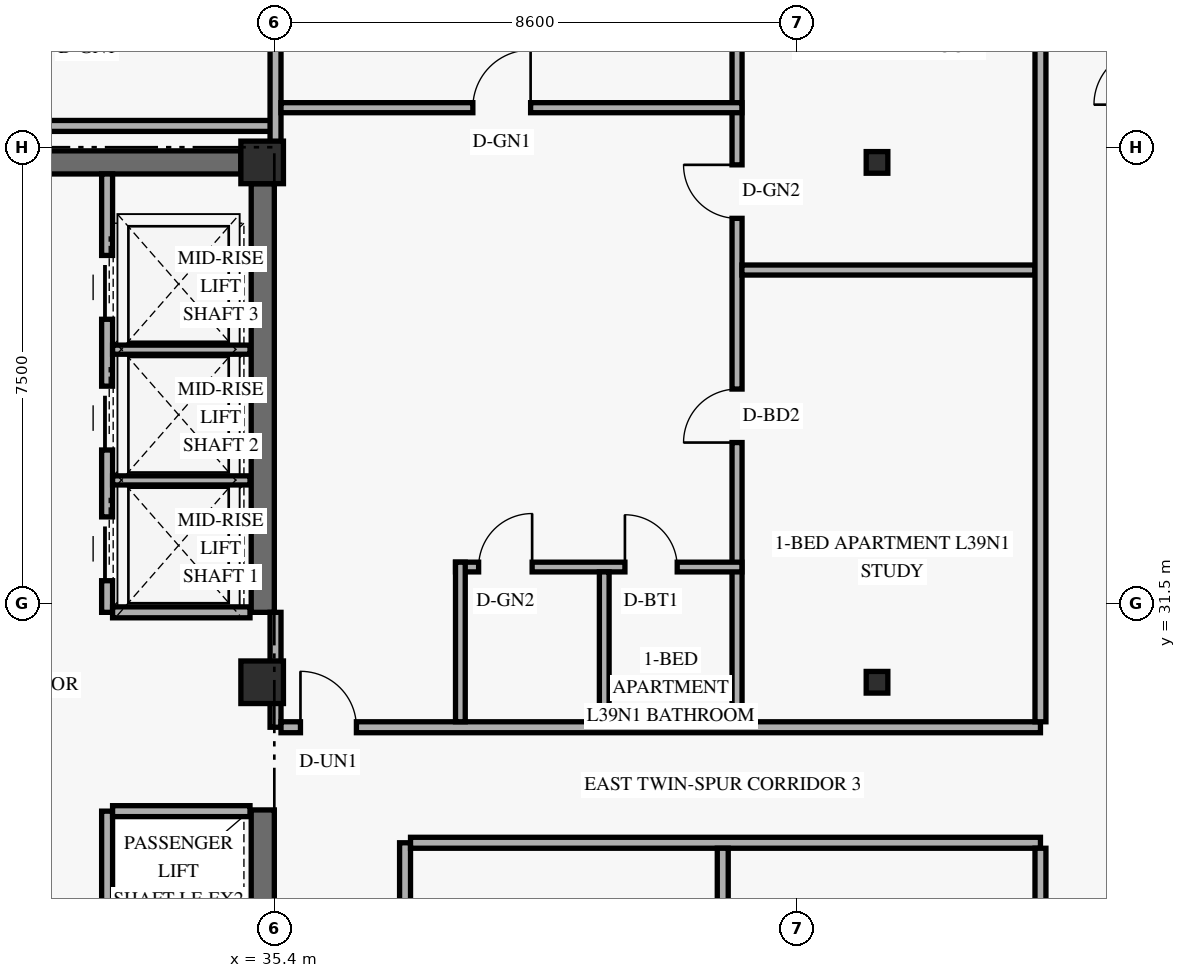
"""IFC4 building model, lengths in metres.
Left out: names, types, materials, properties, quantities, classifications, styles, units other than length and angle.
Written with IfcOpenShell. Run it as: python <this file> out.ifc"""

import sys

from ifc_helpers import new_model, si_unit, direction, frame, frame_2d, origin, origin_2d, place, context, subcontext, project, spatial, rectangle, hollow_rectangle, extrude, element, fill, save


model = new_model("IFC4")
c1 = context("Model", 3, precision=1e-05, world=origin(), true_north=direction((0.0, 1.0)))
c2 = subcontext(c1, "Body", "Model", "MODEL_VIEW")
j1 = project(units=[si_unit("LENGTHUNIT", "METRE"), si_unit("PLANEANGLEUNIT", "RADIAN")], contexts=[c1])
p1 = place(None, origin())
s1 = spatial("IfcSite", under=j1, at=p1, CompositionType="ELEMENT")
p2 = place(p1, origin())
s2 = spatial("IfcBuilding", under=s1, at=p2, CompositionType="ELEMENT")
p3 = place(p2, frame((0.0, 0.0, 151.8)))
s3 = spatial("IfcBuildingStorey", under=s2, at=p3, CompositionType="ELEMENT", Elevation=151.8)
p4 = place(p3, frame((35.21, 17.9, 0.0), z_axis=(0.0, 0.0, 1.0), x_axis=(0.0, 1.0, 0.0)))
e1 = element("IfcWall", 1, at=p4, inside=s3, PredefinedType="SHEAR", context=c2, shape_type="SweptSolid", body=[
    extrude(rectangle(XDim=10.2, YDim=0.38, at=frame_2d((5.1, 0.0))), origin(), (0.0, 0.0, 1.0), 2.748),
])
p5 = place(p3, frame((35.21, 31.35, 0.0), z_axis=(0.0, 0.0, 1.0), x_axis=(0.0, 1.0, 0.0)))
e2 = element("IfcWall", 2, at=p5, inside=s3, PredefinedType="SHEAR", context=c2, shape_type="SweptSolid", body=[
    extrude(rectangle(XDim=7.05, YDim=0.38, at=frame_2d((3.525, 0.0))), origin(), (0.0, 0.0, 1.0), 2.748),
])
p6 = place(p3, frame((24.55, 38.75, 0.0), z_axis=(0.0, 0.0, 1.0), x_axis=(1.0, 0.0, 0.0)))
e3 = element("IfcWall", 3, at=p6, inside=s3, PredefinedType="SHEAR", context=c2, shape_type="SweptSolid", body=[
    extrude(rectangle(XDim=10.3, YDim=0.38, at=frame_2d((5.15, 0.0))), origin(), (0.0, 0.0, 1.0), 3.36),
])
p7 = place(p6, frame((5.2, 0.0, 0.0)))
e4 = element("IfcOpeningElement", 4, at=p7, cuts=e3, PredefinedType="OPENING", context=c2, shape_type="SweptSolid", body=[
    extrude(rectangle(XDim=1.05, YDim=2.15, at=frame_2d((0.525, 1.075))), frame((0.0, 0.2, 0.0), z_axis=(0.0, -1.0, 0.0), x_axis=(1.0, 0.0, 0.0)), (0.0, 0.0, 1.0), 0.4),
])
for number, where, z_axis, x_axis in (
    (5, (35.2, 30.2, 0.0), (0.0, 0.0, 1.0), (1.0, 0.0, 0.0)),
    (6, (35.2, 38.75, 0.0), (0.0, 0.0, 1.0), (1.0, 0.0, 0.0)),
):
    element("IfcColumn", number, at=place(p3, frame(where, z_axis=z_axis, x_axis=x_axis)), inside=s3, PredefinedType="COLUMN", context=c2, shape_type="SweptSolid", body=[
        extrude(rectangle(XDim=0.7, YDim=0.7, at=origin_2d()), origin(), (0.0, 0.0, 1.0), 3.6),
    ])
for number, where, z_axis, x_axis in (
    (7, (45.249, 30.2, 0.0), (0.035, 0.0, 0.999), (0.0, 1.0, 0.0)),
    (8, (45.249, 38.75, 0.0), (0.035, 0.0, 0.999), (0.0, 1.0, 0.0)),
):
    element("IfcColumn", number, at=place(p3, frame(where, z_axis=z_axis, x_axis=x_axis)), inside=s3, PredefinedType="COLUMN", context=c2, shape_type="SweptSolid", body=[
        extrude(hollow_rectangle(XDim=0.356, YDim=0.356, WallThickness=0.016, at=origin_2d()), origin(), (0.0, 0.0, 1.0), 3.602),
    ])
p8 = place(p3, frame((32.65, 18.02, 0.0), z_axis=(0.0, 0.0, 1.0), x_axis=(0.0, 1.0, 0.0)))
e9 = element("IfcWall", 9, at=p8, inside=s3, PredefinedType="STANDARD", context=c2, shape_type="SweptSolid", body=[
    extrude(rectangle(XDim=10.06, YDim=0.18, at=frame_2d((5.03, 0.0))), origin(), (0.0, 0.0, 1.0), 3.36),
])
p9 = place(p3, frame((32.74, 28.08, 0.0), z_axis=(0.0, 0.0, 1.0), x_axis=(1.0, 0.0, 0.0)))
e10 = element("IfcWall", 10, at=p9, inside=s3, PredefinedType="STANDARD", context=c2, shape_type="SweptSolid", body=[
    extrude(rectangle(XDim=2.26, YDim=0.18, at=frame_2d((1.13, 0.0))), origin(), (0.0, 0.0, 1.0), 3.36),
])
p10 = place(p3, frame((32.65, 31.35, 0.0), z_axis=(0.0, 0.0, 1.0), x_axis=(0.0, 1.0, 0.0)))
e11 = element("IfcWall", 11, at=p10, inside=s3, PredefinedType="STANDARD", context=c2, shape_type="SweptSolid", body=[
    extrude(rectangle(XDim=7.21, YDim=0.18, at=frame_2d((3.605, 0.0))), origin(), (0.0, 0.0, 1.0), 3.36),
])
p11 = place(p10, frame((0.52, 0.0, 0.0)))
e12 = element("IfcOpeningElement", 12, at=p11, cuts=e11, PredefinedType="OPENING", context=c2, shape_type="SweptSolid", body=[
    extrude(rectangle(XDim=1.05, YDim=2.2, at=frame_2d((0.525, 1.1))), frame((0.0, 0.1, 0.0), z_axis=(0.0, -1.0, 0.0), x_axis=(1.0, 0.0, 0.0)), (0.0, 0.0, 1.0), 0.2),
])
p12 = place(p10, frame((2.67, 0.0, 0.0)))
e13 = element("IfcOpeningElement", 13, at=p12, cuts=e11, PredefinedType="OPENING", context=c2, shape_type="SweptSolid", body=[
    extrude(rectangle(XDim=1.05, YDim=2.2, at=frame_2d((0.525, 1.1))), frame((0.0, 0.1, 0.0), z_axis=(0.0, -1.0, 0.0), x_axis=(1.0, 0.0, 0.0)), (0.0, 0.0, 1.0), 0.2),
])
p13 = place(p10, frame((4.82, 0.0, 0.0)))
e14 = element("IfcOpeningElement", 14, at=p13, cuts=e11, PredefinedType="OPENING", context=c2, shape_type="SweptSolid", body=[
    extrude(rectangle(XDim=1.05, YDim=2.2, at=frame_2d((0.525, 1.1))), frame((0.0, 0.1, 0.0), z_axis=(0.0, -1.0, 0.0), x_axis=(1.0, 0.0, 0.0)), (0.0, 0.0, 1.0), 0.2),
])
p14 = place(p3, frame((32.74, 31.35, 0.0), z_axis=(0.0, 0.0, 1.0), x_axis=(1.0, 0.0, 0.0)))
e15 = element("IfcWall", 15, at=p14, inside=s3, PredefinedType="STANDARD", context=c2, shape_type="SweptSolid", body=[
    extrude(rectangle(XDim=2.26, YDim=0.18, at=frame_2d((1.13, 0.0))), origin(), (0.0, 0.0, 1.0), 3.36),
])
for number, where, z_axis, x_axis in (
    (16, (32.74, 33.52, 0.0), (0.0, 0.0, 1.0), (1.0, 0.0, 0.0)),
    (17, (32.74, 35.67, 0.0), (0.0, 0.0, 1.0), (1.0, 0.0, 0.0)),
):
    element("IfcWall", number, at=place(p3, frame(where, z_axis=z_axis, x_axis=x_axis)), inside=s3, PredefinedType="STANDARD", context=c2, shape_type="SweptSolid", body=[
        extrude(rectangle(XDim=2.26, YDim=0.15, at=frame_2d((1.13, 0.0))), origin(), (0.0, 0.0, 1.0), 3.36),
    ])
p15 = place(p3, frame((37.55, 17.28, 0.0), z_axis=(0.0, 0.0, 1.0), x_axis=(0.0, 1.0, 0.0)))
e18 = element("IfcWall", 18, at=p15, inside=s3, PredefinedType="STANDARD", context=c2, shape_type="SweptSolid", body=[
    extrude(rectangle(XDim=10.28, YDim=0.18, at=frame_2d((5.14, 0.0))), origin(), (0.0, 0.0, 1.0), 2.73),
])
p16 = place(p15, frame((5.0, 0.0, 0.0)))
e19 = element("IfcOpeningElement", 19, at=p16, cuts=e18, PredefinedType="OPENING", context=c2, shape_type="SweptSolid", body=[
    extrude(rectangle(XDim=0.92, YDim=2.15, at=frame_2d((0.46, 1.075))), frame((0.0, 0.1, 0.0), z_axis=(0.0, -1.0, 0.0), x_axis=(1.0, 0.0, 0.0)), (0.0, 0.0, 1.0), 0.2),
])
p17 = place(p3, frame((37.64, 27.56, 0.0), z_axis=(0.0, 0.0, 1.0), x_axis=(1.0, 0.0, 0.0)))
e20 = element("IfcWall", 20, at=p17, inside=s3, PredefinedType="STANDARD", context=c2, shape_type="SweptSolid", body=[
    extrude(rectangle(XDim=10.36, YDim=0.18, at=frame_2d((5.18, 0.0))), origin(), (0.0, 0.0, 1.0), 2.73),
])
p18 = place(p3, frame((35.42, 29.46, 0.0), z_axis=(0.0, 0.0, 1.0), x_axis=(0.0, 1.0, 0.0)))
e21 = element("IfcWall", 21, at=p18, inside=s3, PredefinedType="STANDARD", context=c2, shape_type="SweptSolid", body=[
    extrude(rectangle(XDim=1.89, YDim=0.18, at=frame_2d((0.945, 0.0))), origin(), (0.0, 0.0, 1.0), 2.73),
])
p19 = place(p3, frame((35.51, 29.46, 0.0), z_axis=(0.0, 0.0, 1.0), x_axis=(1.0, 0.0, 0.0)))
e22 = element("IfcWall", 22, at=p19, inside=s3, PredefinedType="STANDARD", context=c2, shape_type="SweptSolid", body=[
    extrude(rectangle(XDim=12.49, YDim=0.18, at=frame_2d((6.245, 0.0))), origin(), (0.0, 0.0, 1.0), 2.73),
])
p20 = place(p19, frame((0.32, 0.0, 0.0)))
e23 = element("IfcOpeningElement", 23, at=p20, cuts=e22, PredefinedType="OPENING", context=c2, shape_type="SweptSolid", body=[
    extrude(rectangle(XDim=0.92, YDim=2.15, at=frame_2d((0.46, 1.075))), frame((0.0, 0.1, 0.0), z_axis=(0.0, -1.0, 0.0), x_axis=(1.0, 0.0, 0.0)), (0.0, 0.0, 1.0), 0.2),
])
p21 = place(p3, frame((23.85, 39.35, 0.0), z_axis=(0.0, 0.0, 1.0), x_axis=(1.0, 0.0, 0.0)))
e24 = element("IfcWall", 24, at=p21, inside=s3, PredefinedType="STANDARD", context=c2, shape_type="SweptSolid", body=[
    extrude(rectangle(XDim=11.57, YDim=0.18, at=frame_2d((5.785, 0.0))), origin(), (0.0, 0.0, 1.0), 2.73),
])
p22 = place(p3, frame((35.42, 38.75, 0.0), z_axis=(0.0, 0.0, 1.0), x_axis=(0.0, 1.0, 0.0)))
e25 = element("IfcWall", 25, at=p22, inside=s3, PredefinedType="PARTITIONING", context=c2, shape_type="SweptSolid", body=[
    extrude(rectangle(XDim=4.97, YDim=0.18, at=frame_2d((2.485, 0.0))), origin(), (0.0, 0.0, 1.0), 2.73),
])
p23 = place(p3, frame((43.01, 29.55, 0.0), z_axis=(0.0, 0.0, 1.0), x_axis=(0.0, 1.0, 0.0)))
e26 = element("IfcWall", 26, at=p23, inside=s3, PredefinedType="PARTITIONING", context=c2, shape_type="SweptSolid", body=[
    extrude(rectangle(XDim=14.17, YDim=0.165, at=frame_2d((7.085, 0.0))), origin(), (0.0, 0.0, 1.0), 2.73),
])
p24 = place(p23, frame((4.593, 0.0, 0.0)))
e27 = element("IfcOpeningElement", 27, at=p24, cuts=e26, PredefinedType="OPENING", context=c2, shape_type="SweptSolid", body=[
    extrude(rectangle(XDim=0.88, YDim=2.14, at=frame_2d((0.44, 1.07))), frame((0.0, 0.093, 0.0), z_axis=(0.0, -1.0, 0.0), x_axis=(1.0, 0.0, 0.0)), (0.0, 0.0, 1.0), 0.185),
])
p25 = place(p23, frame((8.28, 0.0, 0.0)))
e28 = element("IfcOpeningElement", 28, at=p25, cuts=e26, PredefinedType="OPENING", context=c2, shape_type="SweptSolid", body=[
    extrude(rectangle(XDim=0.88, YDim=2.12, at=frame_2d((0.44, 1.06))), frame((0.0, 0.093, 0.0), z_axis=(0.0, -1.0, 0.0), x_axis=(1.0, 0.0, 0.0)), (0.0, 0.0, 1.0), 0.185),
])
p26 = place(p3, frame((38.38, 32.095, 0.0), z_axis=(0.0, 0.0, 1.0), x_axis=(1.0, 0.0, 0.0)))
e29 = element("IfcWall", 29, at=p26, inside=s3, PredefinedType="PLUMBINGWALL", context=c2, shape_type="SweptSolid", body=[
    extrude(rectangle(XDim=4.71, YDim=0.16, at=frame_2d((2.355, 0.0))), origin(), (0.0, 0.0, 1.0), 3.36),
])
p27 = place(p26, frame((0.38, 0.0, 0.0)))
e30 = element("IfcOpeningElement", 30, at=p27, cuts=e29, PredefinedType="OPENING", context=c2, shape_type="SweptSolid", body=[
    extrude(rectangle(XDim=0.88, YDim=2.12, at=frame_2d((0.44, 1.06))), frame((0.0, 0.09, 0.0), z_axis=(0.0, -1.0, 0.0), x_axis=(1.0, 0.0, 0.0)), (0.0, 0.0, 1.0), 0.18),
])
p28 = place(p26, frame((2.786, 0.0, 0.0)))
e31 = element("IfcOpeningElement", 31, at=p28, cuts=e29, PredefinedType="OPENING", context=c2, shape_type="SweptSolid", body=[
    extrude(rectangle(XDim=0.86, YDim=2.12, at=frame_2d((0.43, 1.06))), frame((0.0, 0.09, 0.0), z_axis=(0.0, -1.0, 0.0), x_axis=(1.0, 0.0, 0.0)), (0.0, 0.0, 1.0), 0.18),
])
p29 = place(p3, frame((38.46, 29.55, 0.0), z_axis=(0.0, 0.0, 1.0), x_axis=(0.0, 1.0, 0.0)))
e32 = element("IfcWall", 32, at=p29, inside=s3, PredefinedType="PLUMBINGWALL", context=c2, shape_type="SweptSolid", body=[
    extrude(rectangle(XDim=2.625, YDim=0.16, at=frame_2d((1.312, 0.0))), origin(), (0.0, 0.0, 1.0), 2.73),
])
p30 = place(p3, frame((40.826, 29.55, 0.0), z_axis=(0.0, 0.0, 1.0), x_axis=(0.0, 1.0, 0.0)))
e33 = element("IfcWall", 33, at=p30, inside=s3, PredefinedType="PLUMBINGWALL", context=c2, shape_type="SweptSolid", body=[
    extrude(rectangle(XDim=2.465, YDim=0.16, at=frame_2d((1.232, 0.0))), origin(), (0.0, 0.0, 1.0), 2.73),
])
p31 = place(p3, frame((35.51, 39.65, 0.0), z_axis=(0.0, 0.0, 1.0), x_axis=(1.0, 0.0, 0.0)))
e34 = element("IfcWall", 34, at=p31, inside=s3, PredefinedType="PARTITIONING", context=c2, shape_type="SweptSolid", body=[
    extrude(rectangle(XDim=7.58, YDim=0.165, at=frame_2d((3.79, 0.0))), origin(), (0.0, 0.0, 1.0), 3.36),
])
p32 = place(p31, frame((3.155, 0.0, 0.0)))
e35 = element("IfcOpeningElement", 35, at=p32, cuts=e34, PredefinedType="OPENING", context=c2, shape_type="SweptSolid", body=[
    extrude(rectangle(XDim=0.95, YDim=2.15, at=frame_2d((0.475, 1.075))), frame((0.0, 0.093, 0.0), z_axis=(0.0, -1.0, 0.0), x_axis=(1.0, 0.0, 0.0)), (0.0, 0.0, 1.0), 0.185),
])
p33 = place(p3, frame((43.09, 36.98, 0.0), z_axis=(0.0, 0.0, 1.0), x_axis=(1.0, 0.0, 0.0)))
e36 = element("IfcWall", 36, at=p33, inside=s3, PredefinedType="PARTITIONING", context=c2, shape_type="SweptSolid", body=[
    extrude(rectangle(XDim=4.82, YDim=0.165, at=frame_2d((2.41, 0.0))), origin(), (0.0, 0.0, 1.0), 2.73),
])
p34 = place(p3, frame((42.775, 17.37, 0.0), z_axis=(0.0, 0.0, 1.0), x_axis=(0.0, 1.0, 0.0)))
e37 = element("IfcWall", 37, at=p34, inside=s3, PredefinedType="PARTITIONING", context=c2, shape_type="SweptSolid", body=[
    extrude(rectangle(XDim=10.1, YDim=0.18, at=frame_2d((5.05, 0.0))), origin(), (0.0, 0.0, 1.0), 2.73),
])
p35 = place(p3, frame((48.0, 17.37, 0.0), z_axis=(0.0, 0.0, 1.0), x_axis=(0.0, 1.0, 0.0)))
e38 = element("IfcWall", 38, at=p35, inside=s3, PredefinedType="STANDARD", context=c2, shape_type="SweptSolid", body=[
    extrude(rectangle(XDim=10.1, YDim=0.18, at=frame_2d((5.05, 0.0))), origin(), (0.0, 0.0, 1.0), 2.73),
])
p36 = place(p3, frame((48.0, 29.55, 0.0), z_axis=(0.0, 0.0, 1.0), x_axis=(0.0, 1.0, 0.0)))
e39 = element("IfcWall", 39, at=p36, inside=s3, PredefinedType="STANDARD", context=c2, shape_type="SweptSolid", body=[
    extrude(rectangle(XDim=14.17, YDim=0.18, at=frame_2d((7.085, 0.0))), origin(), (0.0, 0.0, 1.0), 2.73),
])
p37 = place(p11, origin())
e40 = element("IfcDoor", 40, at=p37, inside=s3, OperationType="SLIDING_TO_LEFT", PredefinedType="DOOR", context=c2, shape_type="SweptSolid", body=[
    extrude(rectangle(XDim=1.05, YDim=2.2, at=frame_2d((0.525, 1.1))), frame((0.0, 0.025, 0.0), z_axis=(0.0, -1.0, 0.0), x_axis=(1.0, 0.0, 0.0)), (0.0, 0.0, 1.0), 0.05),
])
fill(e12, e40)
p38 = place(p12, origin())
e41 = element("IfcDoor", 41, at=p38, inside=s3, OperationType="SLIDING_TO_LEFT", PredefinedType="DOOR", context=c2, shape_type="SweptSolid", body=[
    extrude(rectangle(XDim=1.05, YDim=2.2, at=frame_2d((0.525, 1.1))), frame((0.0, 0.025, 0.0), z_axis=(0.0, -1.0, 0.0), x_axis=(1.0, 0.0, 0.0)), (0.0, 0.0, 1.0), 0.05),
])
fill(e13, e41)
p39 = place(p13, origin())
e42 = element("IfcDoor", 42, at=p39, inside=s3, OperationType="SLIDING_TO_LEFT", PredefinedType="DOOR", context=c2, shape_type="SweptSolid", body=[
    extrude(rectangle(XDim=1.05, YDim=2.2, at=frame_2d((0.525, 1.1))), frame((0.0, 0.025, 0.0), z_axis=(0.0, -1.0, 0.0), x_axis=(1.0, 0.0, 0.0)), (0.0, 0.0, 1.0), 0.05),
])
fill(e14, e42)
p40 = place(p32, origin())
e43 = element("IfcDoor", 43, at=p40, inside=s3, OperationType="SINGLE_SWING_RIGHT", PredefinedType="DOOR", context=c2, shape_type="SweptSolid", body=[
    extrude(rectangle(XDim=0.95, YDim=2.15, at=frame_2d((0.475, 1.075))), frame((0.0, 0.025, 0.0), z_axis=(0.0, -1.0, 0.0), x_axis=(1.0, 0.0, 0.0)), (0.0, 0.0, 1.0), 0.05),
])
fill(e35, e43)
p41 = place(p20, origin())
e44 = element("IfcDoor", 44, at=p41, inside=s3, OperationType="SINGLE_SWING_LEFT", PredefinedType="DOOR", context=c2, shape_type="SweptSolid", body=[
    extrude(rectangle(XDim=0.92, YDim=2.15, at=frame_2d((0.46, 1.075))), frame((0.0, 0.025, 0.0), z_axis=(0.0, -1.0, 0.0), x_axis=(1.0, 0.0, 0.0)), (0.0, 0.0, 1.0), 0.05),
])
fill(e23, e44)
p42 = place(p27, origin())
e45 = element("IfcDoor", 45, at=p42, inside=s3, OperationType="SINGLE_SWING_RIGHT", PredefinedType="DOOR", context=c2, shape_type="SweptSolid", body=[
    extrude(rectangle(XDim=0.88, YDim=2.12, at=frame_2d((0.44, 1.06))), frame((0.0, 0.025, 0.0), z_axis=(0.0, -1.0, 0.0), x_axis=(1.0, 0.0, 0.0)), (0.0, 0.0, 1.0), 0.05),
])
fill(e30, e45)
p43 = place(p28, origin())
e46 = element("IfcDoor", 46, at=p43, inside=s3, OperationType="SINGLE_SWING_LEFT", PredefinedType="DOOR", context=c2, shape_type="SweptSolid", body=[
    extrude(rectangle(XDim=0.86, YDim=2.12, at=frame_2d((0.43, 1.06))), frame((0.0, 0.025, 0.0), z_axis=(0.0, -1.0, 0.0), x_axis=(1.0, 0.0, 0.0)), (0.0, 0.0, 1.0), 0.05),
])
fill(e31, e46)
p44 = place(p24, origin())
e47 = element("IfcDoor", 47, at=p44, inside=s3, OperationType="SINGLE_SWING_LEFT", PredefinedType="DOOR", context=c2, shape_type="SweptSolid", body=[
    extrude(rectangle(XDim=0.88, YDim=2.14, at=frame_2d((0.44, 1.07))), frame((0.0, 0.025, 0.0), z_axis=(0.0, -1.0, 0.0), x_axis=(1.0, 0.0, 0.0)), (0.0, 0.0, 1.0), 0.05),
])
fill(e27, e47)
p45 = place(p25, origin())
e48 = element("IfcDoor", 48, at=p45, inside=s3, OperationType="SINGLE_SWING_RIGHT", PredefinedType="DOOR", context=c2, shape_type="SweptSolid", body=[
    extrude(rectangle(XDim=0.88, YDim=2.12, at=frame_2d((0.44, 1.06))), frame((0.0, 0.025, 0.0), z_axis=(0.0, -1.0, 0.0), x_axis=(1.0, 0.0, 0.0)), (0.0, 0.0, 1.0), 0.05),
])
fill(e28, e48)
save(model, sys.argv[1])
